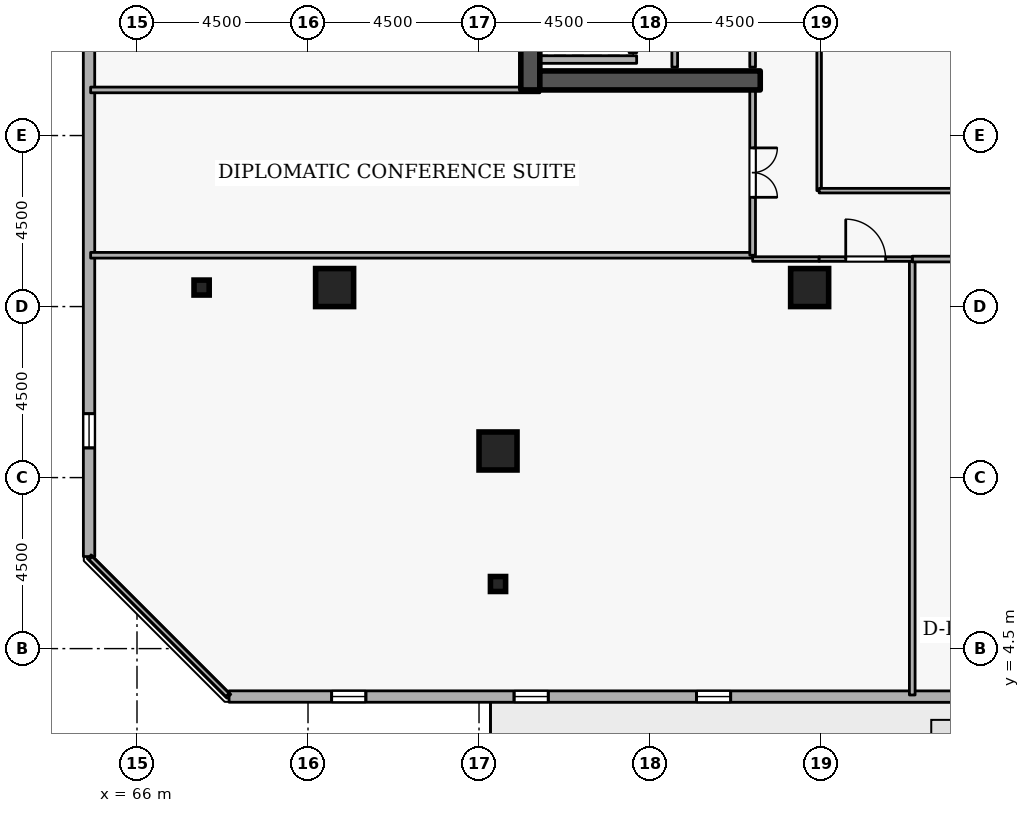
"""IFC4 building model, lengths in metres.
Left out: names, types, materials, properties, quantities, classifications, styles, units other than length and angle.
Written with IfcOpenShell. Run it as: python <this file> out.ifc"""

import sys

from ifc_helpers import new_model, si_unit, direction, frame, frame_2d, origin, origin_2d, place, context, subcontext, project, spatial, rectangle, i_section, extrude, element, fill, save


model = new_model("IFC4")
c1 = context("Model", 3, precision=1e-05, world=origin(), true_north=direction((0.0, 1.0)))
c2 = subcontext(c1, "Body", "Model", "MODEL_VIEW")
j1 = project(units=[si_unit("LENGTHUNIT", "METRE"), si_unit("PLANEANGLEUNIT", "RADIAN")], contexts=[c1])
p1 = place(None, origin())
s1 = spatial("IfcSite", under=j1, at=p1, CompositionType="ELEMENT")
p2 = place(p1, origin())
s2 = spatial("IfcBuilding", under=s1, at=p2, CompositionType="ELEMENT")
p3 = place(p2, frame((0.0, 0.0, 207.3)))
s3 = spatial("IfcBuildingStorey", under=s2, at=p3, CompositionType="ELEMENT", Elevation=207.3)
p4 = place(p3, frame((76.35, 19.2, 0.0), z_axis=(0.0, 0.0, 1.0), x_axis=(0.0, 1.0, 0.0)))
e1 = element("IfcWall", 1, at=p4, inside=s3, PredefinedType="SHEAR", context=c2, shape_type="SweptSolid", body=[
    extrude(rectangle(XDim=15.6, YDim=0.5, at=frame_2d((7.8, 0.0))), origin(), (0.0, 0.0, 1.0), 3.6),
])
p5 = place(p3, frame((76.6, 19.45, 0.0), z_axis=(0.0, 0.0, 1.0), x_axis=(1.0, 0.0, 0.0)))
e2 = element("IfcWall", 2, at=p5, inside=s3, PredefinedType="SHEAR", context=c2, shape_type="SweptSolid", body=[
    extrude(rectangle(XDim=5.8, YDim=0.5, at=frame_2d((2.9, 0.0))), origin(), (0.0, 0.0, 1.0), 3.6),
])
for number, where, z_axis, x_axis in (
    (3, (71.2, 14.0, 0.0), (0.0, 0.0, 1.0), (1.0, 0.0, 0.0)),
    (4, (75.5, 9.7, 0.0), (0.0, 0.0, 1.0), (1.0, 0.0, 0.0)),
    (5, (83.7, 14.0, 0.0), (0.0, 0.0, 1.0), (1.0, 0.0, 0.0)),
):
    element("IfcColumn", number, at=place(p3, frame(where, z_axis=z_axis, x_axis=x_axis)), inside=s3, PredefinedType="COLUMN", context=c2, shape_type="SweptSolid", body=[
        extrude(rectangle(XDim=1.0, YDim=1.0, at=origin_2d()), origin(), (0.0, 0.0, 1.0), 3.6),
    ])
for number, where, z_axis, x_axis in (
    (6, (67.7, 14.0, 0.0), (0.0, 0.0, 1.0), (1.0, 0.0, 0.0)),
    (7, (75.5, 6.2, 0.0), (0.0, 0.0, 1.0), (1.0, 0.0, 0.0)),
):
    element("IfcColumn", number, at=place(p3, frame(where, z_axis=z_axis, x_axis=x_axis)), inside=s3, PredefinedType="COLUMN", context=c2, shape_type="SweptSolid", body=[
        extrude(i_section(OverallWidth=0.399, OverallDepth=0.394, WebThickness=0.023, FlangeThickness=0.037, FilletRadius=0.015, at=origin_2d()), origin(), (0.0, 0.0, 1.0), 3.6),
    ])
p6 = place(p3, frame((68.422, 3.239, 0.0), z_axis=(0.0, 0.0, 1.0), x_axis=(0.999999994606, -0.000103863011, 0.0)))
e8 = element("IfcWall", 8, at=p6, inside=s3, PredefinedType="STANDARD", context=c2, shape_type="SweptSolid", body=[
    extrude(rectangle(XDim=35.259, YDim=0.3, at=frame_2d((17.629, 0.0))), origin(), (0.0, 0.0, 1.0), 2.7),
])
p7 = place(p6, frame((19.43, 0.0, 0.0)))
e9 = element("IfcOpeningElement", 9, at=p7, cuts=e8, PredefinedType="OPENING", context=c2, shape_type="SweptSolid", body=[
    extrude(rectangle(XDim=1.0, YDim=2.08, at=frame_2d((0.5, 1.04))), frame((0.0, 0.16, 0.0), z_axis=(0.0, -1.0, 0.0), x_axis=(1.0, 0.0, 0.0)), (0.0, 0.0, 1.0), 0.32),
])
p8 = place(p6, frame((2.7, 0.0, 0.72)))
e10 = element("IfcOpeningElement", 10, at=p8, cuts=e8, PredefinedType="OPENING", context=c2, shape_type="SweptSolid", body=[
    extrude(rectangle(XDim=0.9, YDim=1.75, at=frame_2d((0.45, 0.875))), frame((0.0, 0.16, 0.0), z_axis=(0.0, -1.0, 0.0), x_axis=(1.0, 0.0, 0.0)), (0.0, 0.0, 1.0), 0.32),
])
p9 = place(p6, frame((7.5, 0.0, 0.72)))
e11 = element("IfcOpeningElement", 11, at=p9, cuts=e8, PredefinedType="OPENING", context=c2, shape_type="SweptSolid", body=[
    extrude(rectangle(XDim=0.9, YDim=1.75, at=frame_2d((0.45, 0.875))), frame((0.0, 0.16, 0.0), z_axis=(0.0, -1.0, 0.0), x_axis=(1.0, 0.0, 0.0)), (0.0, 0.0, 1.0), 0.32),
])
p10 = place(p6, frame((12.3, 0.0, 0.72)))
e12 = element("IfcOpeningElement", 12, at=p10, cuts=e8, PredefinedType="OPENING", context=c2, shape_type="SweptSolid", body=[
    extrude(rectangle(XDim=0.9, YDim=1.75, at=frame_2d((0.45, 0.875))), frame((0.0, 0.16, 0.0), z_axis=(0.0, -1.0, 0.0), x_axis=(1.0, 0.0, 0.0)), (0.0, 0.0, 1.0), 0.32),
])
p11 = place(p6, frame((26.7, 0.0, 0.72)))
e13 = element("IfcOpeningElement", 13, at=p11, cuts=e8, PredefinedType="OPENING", context=c2, shape_type="SweptSolid", body=[
    extrude(rectangle(XDim=0.9, YDim=1.75, at=frame_2d((0.45, 0.875))), frame((0.0, 0.16, 0.0), z_axis=(0.0, -1.0, 0.0), x_axis=(1.0, 0.0, 0.0)), (0.0, 0.0, 1.0), 0.32),
])
p12 = place(p6, frame((31.5, 0.0, 0.72)))
e14 = element("IfcOpeningElement", 14, at=p12, cuts=e8, PredefinedType="OPENING", context=c2, shape_type="SweptSolid", body=[
    extrude(rectangle(XDim=0.9, YDim=1.75, at=frame_2d((0.45, 0.875))), frame((0.0, 0.16, 0.0), z_axis=(0.0, -1.0, 0.0), x_axis=(1.0, 0.0, 0.0)), (0.0, 0.0, 1.0), 0.32),
])
p13 = place(p3, frame((64.735, 42.181, 0.0), z_axis=(0.0, 0.0, 1.0), x_axis=(0.000103863011, -0.999999994606, 0.0)))
e15 = element("IfcWall", 15, at=p13, inside=s3, PredefinedType="STANDARD", context=c2, shape_type="SweptSolid", body=[
    extrude(rectangle(XDim=35.259, YDim=0.3, at=frame_2d((17.629, 0.0))), origin(), (0.0, 0.0, 1.0), 2.7),
])
p14 = place(p13, frame((2.7, 0.0, 0.72)))
e16 = element("IfcOpeningElement", 16, at=p14, cuts=e15, PredefinedType="OPENING", context=c2, shape_type="SweptSolid", body=[
    extrude(rectangle(XDim=0.9, YDim=1.75, at=frame_2d((0.45, 0.875))), frame((0.0, 0.16, 0.0), z_axis=(0.0, -1.0, 0.0), x_axis=(1.0, 0.0, 0.0)), (0.0, 0.0, 1.0), 0.32),
])
p15 = place(p13, frame((7.5, 0.0, 0.72)))
e17 = element("IfcOpeningElement", 17, at=p15, cuts=e15, PredefinedType="OPENING", context=c2, shape_type="SweptSolid", body=[
    extrude(rectangle(XDim=0.9, YDim=1.75, at=frame_2d((0.45, 0.875))), frame((0.0, 0.16, 0.0), z_axis=(0.0, -1.0, 0.0), x_axis=(1.0, 0.0, 0.0)), (0.0, 0.0, 1.0), 0.32),
])
p16 = place(p13, frame((12.3, 0.0, 0.72)))
e18 = element("IfcOpeningElement", 18, at=p16, cuts=e15, PredefinedType="OPENING", context=c2, shape_type="SweptSolid", body=[
    extrude(rectangle(XDim=0.9, YDim=1.75, at=frame_2d((0.45, 0.875))), frame((0.0, 0.16, 0.0), z_axis=(0.0, -1.0, 0.0), x_axis=(1.0, 0.0, 0.0)), (0.0, 0.0, 1.0), 0.32),
])
p17 = place(p13, frame((17.1, 0.0, 0.72)))
e19 = element("IfcOpeningElement", 19, at=p17, cuts=e15, PredefinedType="OPENING", context=c2, shape_type="SweptSolid", body=[
    extrude(rectangle(XDim=0.9, YDim=1.75, at=frame_2d((0.45, 0.875))), frame((0.0, 0.16, 0.0), z_axis=(0.0, -1.0, 0.0), x_axis=(1.0, 0.0, 0.0)), (0.0, 0.0, 1.0), 0.32),
])
p18 = place(p13, frame((31.5, 0.0, 0.72)))
e20 = element("IfcOpeningElement", 20, at=p18, cuts=e15, PredefinedType="OPENING", context=c2, shape_type="SweptSolid", body=[
    extrude(rectangle(XDim=0.9, YDim=1.75, at=frame_2d((0.45, 0.875))), frame((0.0, 0.16, 0.0), z_axis=(0.0, -1.0, 0.0), x_axis=(1.0, 0.0, 0.0)), (0.0, 0.0, 1.0), 0.32),
])
p19 = place(p3, frame((79.05, 20.18, 0.0), z_axis=(0.0, 0.0, 1.0), x_axis=(0.0, 1.0, 0.0)))
e21 = element("IfcWall", 21, at=p19, inside=s3, PredefinedType="STANDARD", context=c2, shape_type="SweptSolid", body=[
    extrude(rectangle(XDim=1.94, YDim=0.2, at=frame_2d((0.97, 0.0))), origin(), (0.0, 0.0, 1.0), 3.34),
])
p20 = place(p19, frame((0.46, 0.0, 0.0)))
e22 = element("IfcOpeningElement", 22, at=p20, cuts=e21, PredefinedType="OPENING", context=c2, shape_type="SweptSolid", body=[
    extrude(rectangle(XDim=1.02, YDim=2.06, at=frame_2d((0.51, 1.03))), frame((0.0, 0.11, 0.0), z_axis=(0.0, -1.0, 0.0), x_axis=(1.0, 0.0, 0.0)), (0.0, 0.0, 1.0), 0.22),
])
p21 = place(p3, frame((76.612, 20.0, 0.0), z_axis=(0.0, 0.0, 1.0), x_axis=(1.0, 0.0, 0.0)))
e23 = element("IfcWall", 23, at=p21, inside=s3, PredefinedType="STANDARD", context=c2, shape_type="SweptSolid", body=[
    extrude(rectangle(XDim=2.536, YDim=0.2, at=frame_2d((1.268, 0.0))), origin(), (0.0, 0.0, 1.0), 3.34),
])
p22 = place(p3, frame((80.15, 19.8, 0.0), z_axis=(0.0, 0.0, 1.0), x_axis=(0.0, 1.0, 0.0)))
e24 = element("IfcWall", 24, at=p22, inside=s3, PredefinedType="PARTITIONING", context=c2, shape_type="SweptSolid", body=[
    extrude(rectangle(XDim=4.25, YDim=0.15, at=frame_2d((2.125, 0.0))), origin(), (0.0, 0.0, 1.0), 3.34),
])
p23 = place(p3, frame((82.2, 24.05, 0.0), z_axis=(0.0, 0.0, 1.0), x_axis=(0.0, -1.0, 0.0)))
e25 = element("IfcWall", 25, at=p23, inside=s3, PredefinedType="PARTITIONING", context=c2, shape_type="SweptSolid", body=[
    extrude(rectangle(XDim=4.25, YDim=0.15, at=frame_2d((2.125, 0.0))), origin(), (0.0, 0.0, 1.0), 3.34),
])
p24 = place(p23, frame((1.665, 0.0, 0.0)))
e26 = element("IfcOpeningElement", 26, at=p24, cuts=e25, PredefinedType="OPENING", context=c2, shape_type="SweptSolid", body=[
    extrude(rectangle(XDim=0.92, YDim=2.08, at=frame_2d((0.46, 1.04))), frame((0.0, 0.085, 0.0), z_axis=(0.0, -1.0, 0.0), x_axis=(1.0, 0.0, 0.0)), (0.0, 0.0, 1.0), 0.17),
])
p25 = place(p3, frame((82.2, 14.85, 0.0), z_axis=(0.0, 0.0, 1.0), x_axis=(-1.0, 0.0, 0.0)))
e27 = element("IfcWall", 27, at=p25, inside=s3, PredefinedType="PARTITIONING", context=c2, shape_type="SweptSolid", body=[
    extrude(rectangle(XDim=17.42, YDim=0.15, at=frame_2d((8.71, 0.0))), origin(), (0.0, 0.0, 1.0), 3.34),
])
p26 = place(p3, frame((64.78, 19.2, 0.0), z_axis=(0.0, 0.0, 1.0), x_axis=(1.0, 0.0, 0.0)))
e28 = element("IfcWall", 28, at=p26, inside=s3, PredefinedType="PARTITIONING", context=c2, shape_type="SweptSolid", body=[
    extrude(rectangle(XDim=11.82, YDim=0.15, at=frame_2d((5.91, 0.0))), origin(), (0.0, 0.0, 1.0), 2.545),
])
p27 = place(p3, frame((82.2, 19.2, 0.0), z_axis=(0.0, 0.0, 1.0), x_axis=(0.0, -1.0, 0.0)))
e29 = element("IfcWall", 29, at=p27, inside=s3, PredefinedType="PARTITIONING", context=c2, shape_type="SweptSolid", body=[
    extrude(rectangle(XDim=4.35, YDim=0.15, at=frame_2d((2.175, 0.0))), origin(), (0.0, 0.0, 1.0), 3.34),
])
p28 = place(p27, frame((1.525, 0.0, 0.0)))
e30 = element("IfcOpeningElement", 30, at=p28, cuts=e29, PredefinedType="OPENING", context=c2, shape_type="SweptSolid", body=[
    extrude(rectangle(XDim=1.3, YDim=2.12, at=frame_2d((0.65, 1.06))), frame((0.0, 0.085, 0.0), z_axis=(0.0, -1.0, 0.0), x_axis=(1.0, 0.0, 0.0)), (0.0, 0.0, 1.0), 0.17),
])
p29 = place(p3, frame((86.4, 3.28, 0.0), z_axis=(0.0, 0.0, 1.0), x_axis=(0.0, 1.0, 0.0)))
e31 = element("IfcWall", 31, at=p29, inside=s3, PredefinedType="PARTITIONING", context=c2, shape_type="SweptSolid", body=[
    extrude(rectangle(XDim=11.47, YDim=0.15, at=frame_2d((5.735, 0.0))), origin(), (0.0, 0.0, 1.0), 3.34),
])
p30 = place(p3, frame((86.4, 14.75, 0.0), z_axis=(0.0, 0.0, 1.0), x_axis=(1.0, 0.0, 0.0)))
e32 = element("IfcWall", 32, at=p30, inside=s3, PredefinedType="PARTITIONING", context=c2, shape_type="SweptSolid", body=[
    extrude(rectangle(XDim=4.2, YDim=0.15, at=frame_2d((2.1, 0.0))), origin(), (0.0, 0.0, 1.0), 3.34),
])
p31 = place(p30, frame((1.45, 0.0, 0.0)))
e33 = element("IfcOpeningElement", 33, at=p31, cuts=e32, PredefinedType="OPENING", context=c2, shape_type="SweptSolid", body=[
    extrude(rectangle(XDim=1.3, YDim=2.12, at=frame_2d((0.65, 1.06))), frame((0.0, 0.085, 0.0), z_axis=(0.0, -1.0, 0.0), x_axis=(1.0, 0.0, 0.0)), (0.0, 0.0, 1.0), 0.17),
])
p32 = place(p3, frame((68.383, 3.28, 0.0), z_axis=(0.0, 0.0, 1.0), x_axis=(-0.707106781187, 0.707106781187, 0.0)))
e34 = element("IfcWall", 34, at=p32, inside=s3, PredefinedType="PARTITIONING", context=c2, shape_type="SweptSolid", body=[
    extrude(rectangle(XDim=5.095, YDim=0.12, at=frame_2d((2.547, 0.0))), origin(), (0.0, 0.0, 1.0), 3.34),
])
p33 = place(p3, frame((82.2, 14.75, 0.0), z_axis=(0.0, 0.0, 1.0), x_axis=(1.0, 0.0, 0.0)))
e35 = element("IfcWall", 35, at=p33, inside=s3, PredefinedType="PARTITIONING", context=c2, shape_type="SweptSolid", body=[
    extrude(rectangle(XDim=1.75, YDim=0.12, at=frame_2d((0.875, 0.0))), origin(), (0.0, 0.0, 1.0), 3.34),
])
p34 = place(p3, frame((83.95, 14.75, 0.0), z_axis=(0.0, 0.0, 1.0), x_axis=(1.0, 0.0, 0.0)))
e36 = element("IfcWall", 36, at=p34, inside=s3, PredefinedType="PARTITIONING", context=c2, shape_type="SweptSolid", body=[
    extrude(rectangle(XDim=2.45, YDim=0.12, at=frame_2d((1.225, 0.0))), origin(), (0.0, 0.0, 1.0), 3.34),
])
p35 = place(p34, frame((0.7, 0.0, 0.0)))
e37 = element("IfcOpeningElement", 37, at=p35, cuts=e36, PredefinedType="OPENING", context=c2, shape_type="SweptSolid", body=[
    extrude(rectangle(XDim=1.05, YDim=2.1, at=frame_2d((0.525, 1.05))), frame((0.0, 0.07, 0.0), z_axis=(0.0, -1.0, 0.0), x_axis=(1.0, 0.0, 0.0)), (0.0, 0.0, 1.0), 0.14),
])
p36 = place(p3, frame((83.95, 16.55, 0.0), z_axis=(0.0, 0.0, 1.0), x_axis=(0.0, 1.0, 0.0)))
e38 = element("IfcWall", 38, at=p36, inside=s3, PredefinedType="PARTITIONING", context=c2, shape_type="SweptSolid", body=[
    extrude(rectangle(XDim=5.85, YDim=0.12, at=frame_2d((2.925, 0.0))), origin(), (0.0, 0.0, 1.0), 3.34),
])
p37 = place(p3, frame((93.05, 16.55, 0.0), z_axis=(0.0, 0.0, 1.0), x_axis=(-1.0, 0.0, 0.0)))
e39 = element("IfcWall", 39, at=p37, inside=s3, PredefinedType="PARTITIONING", context=c2, shape_type="SweptSolid", body=[
    extrude(rectangle(XDim=9.1, YDim=0.12, at=frame_2d((4.55, 0.0))), origin(), (0.0, 0.0, 1.0), 3.34),
])
p38 = place(p37, frame((4.075, 0.0, 0.0)))
e40 = element("IfcOpeningElement", 40, at=p38, cuts=e39, PredefinedType="OPENING", context=c2, shape_type="SweptSolid", body=[
    extrude(rectangle(XDim=0.95, YDim=2.1, at=frame_2d((0.475, 1.05))), frame((0.0, 0.07, 0.0), z_axis=(0.0, -1.0, 0.0), x_axis=(1.0, 0.0, 0.0)), (0.0, 0.0, 1.0), 0.14),
])
p39 = place(p8, origin())
e41 = element("IfcWindow", 41, at=p39, inside=s3, PartitioningType="SINGLE_PANEL", PredefinedType="WINDOW", context=c2, shape_type="SweptSolid", body=[
    extrude(rectangle(XDim=0.9, YDim=1.75, at=frame_2d((0.45, 0.875))), frame((0.0, 0.03, 0.0), z_axis=(0.0, -1.0, 0.0), x_axis=(1.0, 0.0, 0.0)), (0.0, 0.0, 1.0), 0.06),
])
fill(e10, e41)
p40 = place(p9, origin())
e42 = element("IfcWindow", 42, at=p40, inside=s3, PartitioningType="SINGLE_PANEL", PredefinedType="WINDOW", context=c2, shape_type="SweptSolid", body=[
    extrude(rectangle(XDim=0.9, YDim=1.75, at=frame_2d((0.45, 0.875))), frame((0.0, 0.03, 0.0), z_axis=(0.0, -1.0, 0.0), x_axis=(1.0, 0.0, 0.0)), (0.0, 0.0, 1.0), 0.06),
])
fill(e11, e42)
p41 = place(p10, origin())
e43 = element("IfcWindow", 43, at=p41, inside=s3, PartitioningType="SINGLE_PANEL", PredefinedType="WINDOW", context=c2, shape_type="SweptSolid", body=[
    extrude(rectangle(XDim=0.9, YDim=1.75, at=frame_2d((0.45, 0.875))), frame((0.0, 0.03, 0.0), z_axis=(0.0, -1.0, 0.0), x_axis=(1.0, 0.0, 0.0)), (0.0, 0.0, 1.0), 0.06),
])
fill(e12, e43)
p42 = place(p18, origin())
e44 = element("IfcWindow", 44, at=p42, inside=s3, PartitioningType="SINGLE_PANEL", PredefinedType="WINDOW", context=c2, shape_type="SweptSolid", body=[
    extrude(rectangle(XDim=0.9, YDim=1.75, at=frame_2d((0.45, 0.875))), frame((0.0, 0.03, 0.0), z_axis=(0.0, -1.0, 0.0), x_axis=(1.0, 0.0, 0.0)), (0.0, 0.0, 1.0), 0.06),
])
fill(e20, e44)
p43 = place(p28, origin())
e45 = element("IfcDoor", 45, at=p43, inside=s3, OperationType="DOUBLE_DOOR_SINGLE_SWING", PredefinedType="DOOR", context=c2, shape_type="SweptSolid", body=[
    extrude(rectangle(XDim=1.3, YDim=2.12, at=frame_2d((0.65, 1.06))), frame((0.0, 0.025, 0.0), z_axis=(0.0, -1.0, 0.0), x_axis=(1.0, 0.0, 0.0)), (0.0, 0.0, 1.0), 0.05),
])
fill(e30, e45)
p44 = place(p35, origin())
e46 = element("IfcDoor", 46, at=p44, inside=s3, OperationType="SINGLE_SWING_LEFT", PredefinedType="DOOR", context=c2, shape_type="SweptSolid", body=[
    extrude(rectangle(XDim=1.05, YDim=2.1, at=frame_2d((0.525, 1.05))), frame((0.0, 0.025, 0.0), z_axis=(0.0, -1.0, 0.0), x_axis=(1.0, 0.0, 0.0)), (0.0, 0.0, 1.0), 0.05),
])
fill(e37, e46)
save(model, sys.argv[1])
